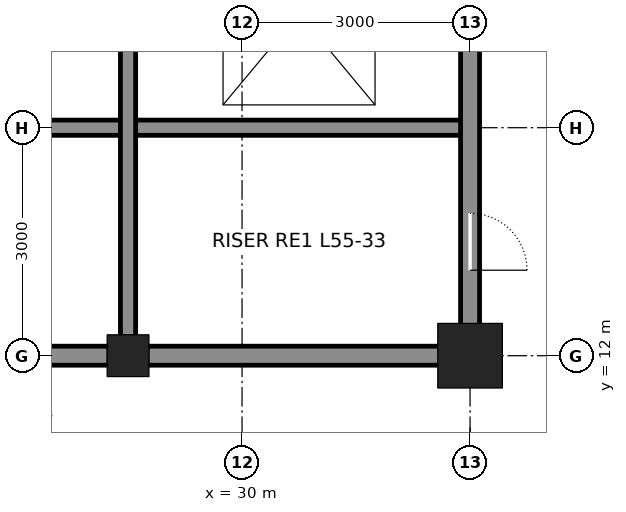
"""IFC4 building model, lengths in metres.
Left out: names, types, materials, properties, quantities, classifications, styles, units other than length and angle.
Written with IfcOpenShell. Run it as: python <this file> out.ifc"""

import sys

from ifc_helpers import new_model, si_unit, direction, frame, frame_2d, origin, origin_2d, place, context, subcontext, project, spatial, rectangle, hollow_rectangle, extrude, element, fill, save


model = new_model("IFC4")
c1 = context("Model", 3, precision=1e-05, world=origin(), true_north=direction((0.0, 1.0)))
c2 = subcontext(c1, "Body", "Model", "MODEL_VIEW")
j1 = project(units=[si_unit("LENGTHUNIT", "METRE"), si_unit("PLANEANGLEUNIT", "RADIAN")], contexts=[c1])
p1 = place(None, origin())
s1 = spatial("IfcSite", under=j1, at=p1, CompositionType="ELEMENT")
p2 = place(p1, origin())
s2 = spatial("IfcBuilding", under=s1, at=p2, CompositionType="ELEMENT")
p3 = place(p2, frame((0.0, 0.0, 247.5)))
s3 = spatial("IfcBuildingStorey", under=s2, at=p3, CompositionType="ELEMENT", Elevation=247.5)
p4 = place(p3, frame((28.5, 12.0, 0.0), z_axis=(0.0, 0.0, 1.0), x_axis=(1.0, 0.0, 0.0)))
e1 = element("IfcColumn", 1, at=p4, inside=s3, PredefinedType="COLUMN", context=c2, shape_type="SweptSolid", body=[
    extrude(hollow_rectangle(XDim=0.55, YDim=0.55, WallThickness=0.045, at=origin_2d()), origin(), (0.0, 0.0, 1.0), 4.2),
])
p5 = place(p3, frame((33.0, 12.0, 0.0), z_axis=(0.0, 0.0, 1.0), x_axis=(1.0, 0.0, 0.0)))
e2 = element("IfcColumn", 2, at=p5, inside=s3, PredefinedType="COLUMN", context=c2, shape_type="SweptSolid", body=[
    extrude(hollow_rectangle(XDim=0.85, YDim=0.85, WallThickness=0.085, at=origin_2d()), origin(), (0.0, 0.0, 1.0), 4.2),
])
p6 = place(p3, frame((25.75, 12.0, 0.0), z_axis=(0.0, 0.0, 1.0), x_axis=(1.0, 0.0, 0.0)))
e3 = element("IfcWall", 3, at=p6, inside=s3, PredefinedType="SOLIDWALL", context=c2, shape_type="SweptSolid", body=[
    extrude(rectangle(XDim=2.5, YDim=0.25, at=frame_2d((1.25, 0.0))), origin(), (0.0, 0.0, 1.0), 3.181),
])
p7 = place(p3, frame((28.75, 12.0, 0.0), z_axis=(0.0, 0.0, 1.0), x_axis=(1.0, 0.0, 0.0)))
e4 = element("IfcWall", 4, at=p7, inside=s3, PredefinedType="SOLIDWALL", context=c2, shape_type="SweptSolid", body=[
    extrude(rectangle(XDim=4.0, YDim=0.25, at=frame_2d((2.0, 0.0))), origin(), (0.0, 0.0, 1.0), 3.181),
])
p8 = place(p3, frame((25.5, 15.0, 0.0), z_axis=(0.0, 0.0, 1.0), x_axis=(1.0, 0.0, 0.0)))
e5 = element("IfcWall", 5, at=p8, inside=s3, PredefinedType="SOLIDWALL", context=c2, shape_type="SweptSolid", body=[
    extrude(rectangle(XDim=7.5, YDim=0.2, at=frame_2d((3.75, 0.0))), origin(), (0.0, 0.0, 1.0), 4.04),
])
p9 = place(p3, frame((28.5, 12.25, 0.0), z_axis=(0.0, 0.0, 1.0), x_axis=(0.0, 1.0, 0.0)))
e6 = element("IfcWall", 6, at=p9, inside=s3, PredefinedType="SOLIDWALL", context=c2, shape_type="SweptSolid", body=[
    extrude(rectangle(XDim=8.5, YDim=0.2, at=frame_2d((4.25, 0.0))), origin(), (0.0, 0.0, 1.0), 3.113),
])
p10 = place(p3, frame((33.0, 12.25, 0.0), z_axis=(0.0, 0.0, 1.0), x_axis=(0.0, 1.0, 0.0)))
e7 = element("IfcWall", 7, at=p10, inside=s3, PredefinedType="SOLIDWALL", context=c2, shape_type="SweptSolid", body=[
    extrude(rectangle(XDim=8.5, YDim=0.25, at=frame_2d((4.25, 0.0))), origin(), (0.0, 0.0, 1.0), 3.113),
])
p11 = place(p10, frame((6.65, 0.0, 0.0)))
e8 = element("IfcOpeningElement", 8, at=p11, cuts=e7, PredefinedType="OPENING", context=c2, shape_type="SweptSolid", body=[
    extrude(rectangle(XDim=1.2, YDim=2.1, at=frame_2d((0.6, 1.05))), frame((0.0, 0.135, 0.0), z_axis=(0.0, -1.0, 0.0), x_axis=(1.0, 0.0, 0.0)), (0.0, 0.0, 1.0), 0.27),
])
p12 = place(p10, frame((0.875, 0.0, 0.0)))
e9 = element("IfcOpeningElement", 9, at=p12, cuts=e7, PredefinedType="OPENING", context=c2, shape_type="SweptSolid", body=[
    extrude(rectangle(XDim=0.75, YDim=2.1, at=frame_2d((0.375, 1.05))), frame((0.0, 0.135, 0.0), z_axis=(0.0, -1.0, 0.0), x_axis=(1.0, 0.0, 0.0)), (0.0, 0.0, 1.0), 0.27),
])
p13 = place(p12, frame((0.75, 0.0, 0.0), z_axis=(0.0, 0.0, 1.0), x_axis=(-1.0, 0.0, 0.0)))
e10 = element("IfcDoor", 10, at=p13, inside=s3, OperationType="SINGLE_SWING_RIGHT", PredefinedType="DOOR", context=c2, shape_type="SweptSolid", body=[
    extrude(rectangle(XDim=0.75, YDim=2.1, at=frame_2d((0.375, 1.05))), frame((0.0, 0.025, 0.0), z_axis=(0.0, -1.0, 0.0), x_axis=(1.0, 0.0, 0.0)), (0.0, 0.0, 1.0), 0.05),
])
fill(e9, e10)
save(model, sys.argv[1])
